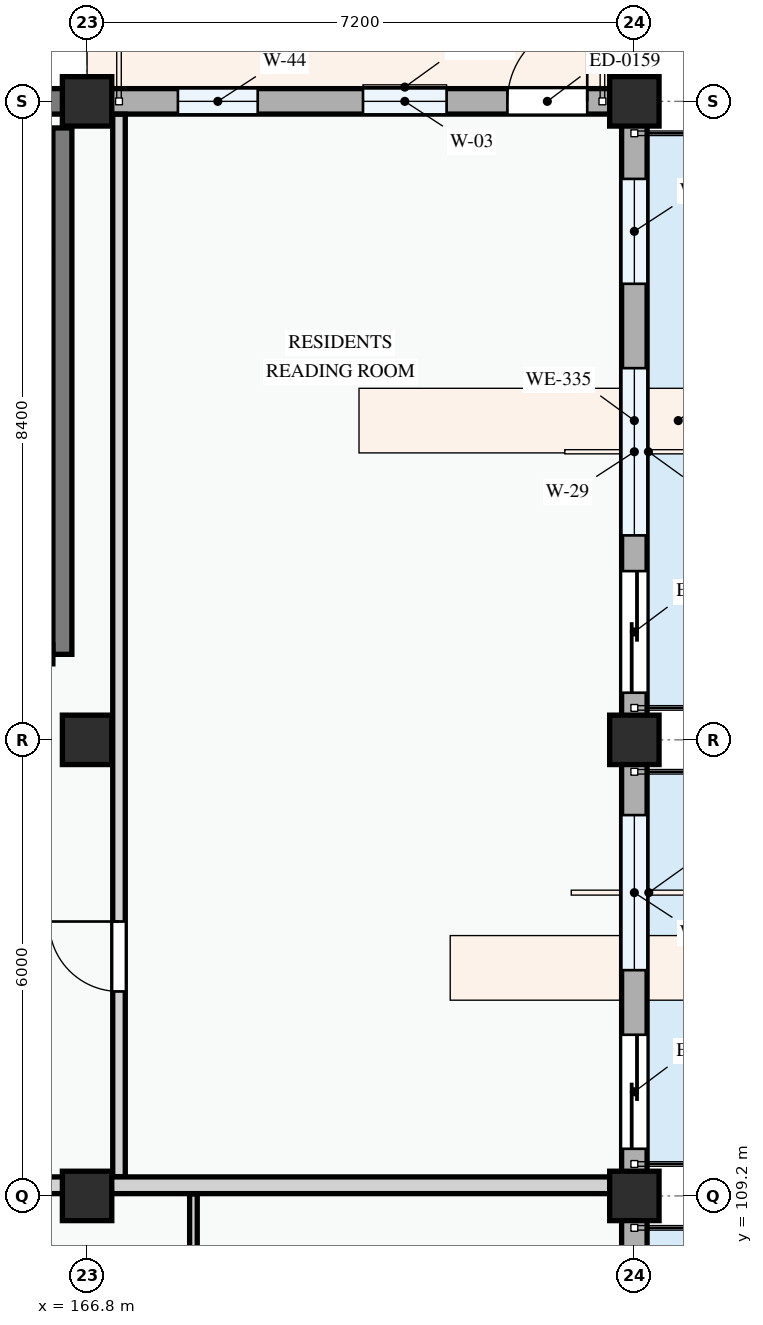
"""IFC4 building model, lengths in metres.
Left out: names, types, materials, properties, quantities, classifications, styles, units other than length and angle.
Written with IfcOpenShell. Run it as: python <this file> out.ifc"""

import sys

from ifc_helpers import new_model, si_unit, direction, frame, frame_2d, origin, origin_2d, place, context, subcontext, project, spatial, rectangle, extrude, element, fill, save


model = new_model("IFC4")
c1 = context("Model", 3, precision=1e-05, world=origin(), true_north=direction((0.0, 1.0)))
c2 = subcontext(c1, "Body", "Model", "MODEL_VIEW")
j1 = project(units=[si_unit("LENGTHUNIT", "METRE"), si_unit("PLANEANGLEUNIT", "RADIAN")], contexts=[c1])
p1 = place(None, origin())
s1 = spatial("IfcSite", under=j1, at=p1, CompositionType="ELEMENT")
p2 = place(p1, origin())
s2 = spatial("IfcBuilding", under=s1, at=p2, CompositionType="ELEMENT")
p3 = place(p2, frame((0.0, 0.0, 14.7)))
s3 = spatial("IfcBuildingStorey", under=s2, at=p3, CompositionType="ELEMENT", Elevation=14.7)
for number, where, z_axis, x_axis in (
    (1, (166.8, 109.2, 0.0), (0.0, 0.0, 1.0), (1.0, 0.0, 0.0)),
    (2, (166.8, 115.2, 0.0), (0.0, 0.0, 1.0), (1.0, 0.0, 0.0)),
    (3, (166.8, 123.6, 0.0), (0.0, 0.0, 1.0), (1.0, 0.0, 0.0)),
    (4, (174.0, 109.2, 0.0), (0.0, 0.0, 1.0), (1.0, 0.0, 0.0)),
    (5, (174.0, 115.2, 0.0), (0.0, 0.0, 1.0), (1.0, 0.0, 0.0)),
    (6, (174.0, 123.6, 0.0), (0.0, 0.0, 1.0), (1.0, 0.0, 0.0)),
):
    element("IfcColumn", number, at=place(p3, frame(where, z_axis=z_axis, x_axis=x_axis)), inside=s3, PredefinedType="COLUMN", context=c2, shape_type="SweptSolid", body=[
        extrude(rectangle(XDim=0.65, YDim=0.65, at=origin_2d()), origin(), (0.0, 0.0, 1.0), 3.3),
    ])
p4 = place(p3, frame((174.0, 109.2, 0.0), z_axis=(0.0, 0.0, 1.0), x_axis=(0.0, 1.0, 0.0)))
e7 = element("IfcWall", 7, at=p4, inside=s3, PredefinedType="STANDARD", context=c2, shape_type="SweptSolid", body=[
    extrude(rectangle(XDim=6.0, YDim=0.335, at=frame_2d((3.0, 0.0))), origin(), (0.0, 0.0, 1.0), 2.575),
])
p5 = place(p4, frame((0.62, 0.0, 0.0)))
e8 = element("IfcOpeningElement", 8, at=p5, cuts=e7, PredefinedType="OPENING", context=c2, shape_type="SweptSolid", body=[
    extrude(rectangle(XDim=1.5, YDim=2.2, at=frame_2d((0.75, 1.1))), frame((0.0, 0.177, 0.0), z_axis=(0.0, -1.0, 0.0), x_axis=(1.0, 0.0, 0.0)), (0.0, 0.0, 1.0), 0.355),
])
p6 = place(p4, frame((2.97, 0.0, 0.78)))
e9 = element("IfcOpeningElement", 9, at=p6, cuts=e7, PredefinedType="OPENING", context=c2, shape_type="SweptSolid", body=[
    extrude(rectangle(XDim=2.04, YDim=1.46, at=frame_2d((1.02, 0.73))), frame((0.0, 0.177, 0.0), z_axis=(0.0, -1.0, 0.0), x_axis=(1.0, 0.0, 0.0)), (0.0, 0.0, 1.0), 0.355),
])
p7 = place(p3, frame((174.0, 115.2, 0.0), z_axis=(0.0, 0.0, 1.0), x_axis=(0.0, 1.0, 0.0)))
e10 = element("IfcWall", 10, at=p7, inside=s3, PredefinedType="STANDARD", context=c2, shape_type="SweptSolid", body=[
    extrude(rectangle(XDim=8.4, YDim=0.335, at=frame_2d((4.2, 0.0))), origin(), (0.0, 0.0, 1.0), 2.425),
])
p8 = place(p7, frame((0.62, 0.0, 0.0)))
e11 = element("IfcOpeningElement", 11, at=p8, cuts=e10, PredefinedType="OPENING", context=c2, shape_type="SweptSolid", body=[
    extrude(rectangle(XDim=1.6, YDim=2.2, at=frame_2d((0.8, 1.1))), frame((0.0, 0.177, 0.0), z_axis=(0.0, -1.0, 0.0), x_axis=(1.0, 0.0, 0.0)), (0.0, 0.0, 1.0), 0.355),
])
p9 = place(p7, frame((2.69, 0.0, 0.78)))
e12 = element("IfcOpeningElement", 12, at=p9, cuts=e10, PredefinedType="OPENING", context=c2, shape_type="SweptSolid", body=[
    extrude(rectangle(XDim=2.2, YDim=1.5, at=frame_2d((1.1, 0.75))), frame((0.0, 0.177, 0.0), z_axis=(0.0, -1.0, 0.0), x_axis=(1.0, 0.0, 0.0)), (0.0, 0.0, 1.0), 0.355),
])
p10 = place(p7, frame((6.0, 0.0, 0.78)))
e13 = element("IfcOpeningElement", 13, at=p10, cuts=e10, PredefinedType="OPENING", context=c2, shape_type="SweptSolid", body=[
    extrude(rectangle(XDim=1.38, YDim=1.48, at=frame_2d((0.69, 0.74))), frame((0.0, 0.177, 0.0), z_axis=(0.0, -1.0, 0.0), x_axis=(1.0, 0.0, 0.0)), (0.0, 0.0, 1.0), 0.355),
])
p11 = place(p3, frame((174.0, 123.6, 0.0), z_axis=(0.0, 0.0, 1.0), x_axis=(-1.0, 0.0, 0.0)))
e14 = element("IfcWall", 14, at=p11, inside=s3, PredefinedType="STANDARD", context=c2, shape_type="SweptSolid", body=[
    extrude(rectangle(XDim=7.2, YDim=0.335, at=frame_2d((3.6, 0.0))), origin(), (0.0, 0.0, 1.0), 2.345),
])
p12 = place(p11, frame((0.62, 0.0, 0.0)))
e15 = element("IfcOpeningElement", 15, at=p12, cuts=e14, PredefinedType="OPENING", context=c2, shape_type="SweptSolid", body=[
    extrude(rectangle(XDim=1.05, YDim=2.15, at=frame_2d((0.525, 1.075))), frame((0.0, 0.177, 0.0), z_axis=(0.0, -1.0, 0.0), x_axis=(1.0, 0.0, 0.0)), (0.0, 0.0, 1.0), 0.355),
])
p13 = place(p11, frame((2.47, 0.0, 0.78)))
e16 = element("IfcOpeningElement", 16, at=p13, cuts=e14, PredefinedType="OPENING", context=c2, shape_type="SweptSolid", body=[
    extrude(rectangle(XDim=1.1, YDim=1.3, at=frame_2d((0.55, 0.65))), frame((0.0, 0.177, 0.0), z_axis=(0.0, -1.0, 0.0), x_axis=(1.0, 0.0, 0.0)), (0.0, 0.0, 1.0), 0.355),
])
p14 = place(p11, frame((4.955, 0.0, 0.78)))
e17 = element("IfcOpeningElement", 17, at=p14, cuts=e14, PredefinedType="OPENING", context=c2, shape_type="SweptSolid", body=[
    extrude(rectangle(XDim=1.05, YDim=1.2, at=frame_2d((0.525, 0.6))), frame((0.0, 0.177, 0.0), z_axis=(0.0, -1.0, 0.0), x_axis=(1.0, 0.0, 0.0)), (0.0, 0.0, 1.0), 0.355),
])
p15 = place(p3, frame((166.8, 123.6, 0.0), z_axis=(0.0, 0.0, 1.0), x_axis=(-1.0, 0.0, 0.0)))
e18 = element("IfcWall", 18, at=p15, inside=s3, PredefinedType="STANDARD", context=c2, shape_type="SweptSolid", body=[
    extrude(rectangle(XDim=0.65, YDim=0.335, at=frame_2d((0.325, 0.0))), origin(), (0.0, 0.0, 1.0), 3.04),
])
p16 = place(p3, frame((174.0, 100.8, 0.0), z_axis=(0.0, 0.0, 1.0), x_axis=(0.0, 1.0, 0.0)))
e19 = element("IfcWall", 19, at=p16, inside=s3, PredefinedType="STANDARD", context=c2, shape_type="SweptSolid", body=[
    extrude(rectangle(XDim=8.4, YDim=0.335, at=frame_2d((4.2, 0.0))), origin(), (0.0, 0.0, 1.0), 2.425),
])
p17 = place(p16, frame((3.462, 0.0, 0.0)))
e20 = element("IfcOpeningElement", 20, at=p17, cuts=e19, PredefinedType="OPENING", context=c2, shape_type="SweptSolid", body=[
    extrude(rectangle(XDim=1.25, YDim=2.2, at=frame_2d((0.625, 1.1))), frame((0.0, 0.177, 0.0), z_axis=(0.0, -1.0, 0.0), x_axis=(1.0, 0.0, 0.0)), (0.0, 0.0, 1.0), 0.355),
])
p18 = place(p16, frame((0.571, 0.0, 0.78)))
e21 = element("IfcOpeningElement", 21, at=p18, cuts=e19, PredefinedType="OPENING", context=c2, shape_type="SweptSolid", body=[
    extrude(rectangle(XDim=2.18, YDim=1.48, at=frame_2d((1.09, 0.74))), frame((0.0, 0.177, 0.0), z_axis=(0.0, -1.0, 0.0), x_axis=(1.0, 0.0, 0.0)), (0.0, 0.0, 1.0), 0.355),
])
p19 = place(p16, frame((5.676, 0.0, 0.78)))
e22 = element("IfcOpeningElement", 22, at=p19, cuts=e19, PredefinedType="OPENING", context=c2, shape_type="SweptSolid", body=[
    extrude(rectangle(XDim=1.62, YDim=1.38, at=frame_2d((0.81, 0.69))), frame((0.0, 0.177, 0.0), z_axis=(0.0, -1.0, 0.0), x_axis=(1.0, 0.0, 0.0)), (0.0, 0.0, 1.0), 0.355),
])
p20 = place(p3, frame((166.475, 123.25, 0.0), z_axis=(0.0, 0.0, 1.0), x_axis=(0.0, -1.0, 0.0)))
e23 = element("IfcWall", 23, at=p20, inside=s3, PredefinedType="SHEAR", context=c2, shape_type="SweptSolid", body=[
    extrude(rectangle(XDim=6.925, YDim=0.25, at=frame_2d((3.462, 0.0))), origin(), (0.0, 0.0, 1.0), 3.0),
])
p21 = place(p3, frame((167.22, 109.452, 0.0), z_axis=(0.0, 0.0, 1.0), x_axis=(0.0, 1.0, 0.0)))
e24 = element("IfcWall", 24, at=p21, inside=s3, PredefinedType="PARTITIONING", context=c2, shape_type="SweptSolid", body=[
    extrude(rectangle(XDim=13.979, YDim=0.165, at=frame_2d((6.989, 0.0))), origin(), (0.0, 0.0, 1.0), 2.425),
])
p22 = place(p21, frame((2.438, 0.0, 0.0)))
e25 = element("IfcOpeningElement", 25, at=p22, cuts=e24, PredefinedType="OPENING", context=c2, shape_type="SweptSolid", body=[
    extrude(rectangle(XDim=0.92, YDim=2.1, at=frame_2d((0.46, 1.05))), frame((0.0, 0.093, 0.0), z_axis=(0.0, -1.0, 0.0), x_axis=(1.0, 0.0, 0.0)), (0.0, 0.0, 1.0), 0.185),
])
p23 = place(p3, frame((168.199, 103.991, 0.0), z_axis=(0.0, 0.0, 1.0), x_axis=(0.0, 1.0, 0.0)))
e26 = element("IfcWall", 26, at=p23, inside=s3, PredefinedType="PARTITIONING", context=c2, shape_type="SweptSolid", body=[
    extrude(rectangle(XDim=5.237, YDim=0.1, at=frame_2d((2.618, 0.0))), origin(), (0.0, 0.0, 1.0), 3.0),
])
p24 = place(p3, frame((162.064, 109.34, 0.0), z_axis=(0.0, 0.0, 1.0), x_axis=(1.0, 0.0, 0.0)))
e27 = element("IfcWall", 27, at=p24, inside=s3, PredefinedType="PARTITIONING", context=c2, shape_type="SweptSolid", body=[
    extrude(rectangle(XDim=11.766, YDim=0.22, at=frame_2d((5.883, 0.0))), origin(), (0.0, 0.0, 1.0), 2.375),
])
p25 = place(p5, frame((1.5, 0.0, 0.0), z_axis=(0.0, 0.0, 1.0), x_axis=(-1.0, 0.0, 0.0)))
e28 = element("IfcDoor", 28, at=p25, inside=s3, OperationType="SLIDING_TO_RIGHT", PredefinedType="DOOR", context=c2, shape_type="SweptSolid", body=[
    extrude(rectangle(XDim=1.5, YDim=2.2, at=frame_2d((0.75, 1.1))), frame((0.0, 0.025, 0.0), z_axis=(0.0, -1.0, 0.0), x_axis=(1.0, 0.0, 0.0)), (0.0, 0.0, 1.0), 0.05),
])
fill(e8, e28)
p26 = place(p6, origin())
e29 = element("IfcWindow", 29, at=p26, inside=s3, PartitioningType="DOUBLE_PANEL_VERTICAL", PredefinedType="WINDOW", context=c2, shape_type="SweptSolid", body=[
    extrude(rectangle(XDim=2.04, YDim=1.46, at=frame_2d((1.02, 0.73))), frame((0.0, 0.03, 0.0), z_axis=(0.0, -1.0, 0.0), x_axis=(1.0, 0.0, 0.0)), (0.0, 0.0, 1.0), 0.06),
])
fill(e9, e29)
p27 = place(p8, frame((1.6, 0.0, 0.0), z_axis=(0.0, 0.0, 1.0), x_axis=(-1.0, 0.0, 0.0)))
e30 = element("IfcDoor", 30, at=p27, inside=s3, OperationType="SLIDING_TO_LEFT", PredefinedType="DOOR", context=c2, shape_type="SweptSolid", body=[
    extrude(rectangle(XDim=1.6, YDim=2.2, at=frame_2d((0.8, 1.1))), frame((0.0, 0.025, 0.0), z_axis=(0.0, -1.0, 0.0), x_axis=(1.0, 0.0, 0.0)), (0.0, 0.0, 1.0), 0.05),
])
fill(e11, e30)
p28 = place(p9, origin())
e31 = element("IfcWindow", 31, at=p28, inside=s3, PartitioningType="DOUBLE_PANEL_VERTICAL", PredefinedType="WINDOW", context=c2, shape_type="SweptSolid", body=[
    extrude(rectangle(XDim=2.2, YDim=1.5, at=frame_2d((1.1, 0.75))), frame((0.0, 0.03, 0.0), z_axis=(0.0, -1.0, 0.0), x_axis=(1.0, 0.0, 0.0)), (0.0, 0.0, 1.0), 0.06),
])
fill(e12, e31)
p29 = place(p10, origin())
e32 = element("IfcWindow", 32, at=p29, inside=s3, PartitioningType="SINGLE_PANEL", PredefinedType="WINDOW", context=c2, shape_type="SweptSolid", body=[
    extrude(rectangle(XDim=1.38, YDim=1.48, at=frame_2d((0.69, 0.74))), frame((0.0, 0.03, 0.0), z_axis=(0.0, -1.0, 0.0), x_axis=(1.0, 0.0, 0.0)), (0.0, 0.0, 1.0), 0.06),
])
fill(e13, e32)
p30 = place(p12, frame((1.05, 0.0, 0.0), z_axis=(0.0, 0.0, 1.0), x_axis=(-1.0, 0.0, 0.0)))
e33 = element("IfcDoor", 33, at=p30, inside=s3, OperationType="SINGLE_SWING_RIGHT", PredefinedType="DOOR", context=c2, shape_type="SweptSolid", body=[
    extrude(rectangle(XDim=1.05, YDim=2.15, at=frame_2d((0.525, 1.075))), frame((0.0, 0.025, 0.0), z_axis=(0.0, -1.0, 0.0), x_axis=(1.0, 0.0, 0.0)), (0.0, 0.0, 1.0), 0.05),
])
fill(e15, e33)
p31 = place(p13, origin())
e34 = element("IfcWindow", 34, at=p31, inside=s3, PartitioningType="SINGLE_PANEL", PredefinedType="WINDOW", context=c2, shape_type="SweptSolid", body=[
    extrude(rectangle(XDim=1.1, YDim=1.3, at=frame_2d((0.55, 0.65))), frame((0.0, 0.03, 0.0), z_axis=(0.0, -1.0, 0.0), x_axis=(1.0, 0.0, 0.0)), (0.0, 0.0, 1.0), 0.06),
])
fill(e16, e34)
p32 = place(p14, origin())
e35 = element("IfcWindow", 35, at=p32, inside=s3, PartitioningType="SINGLE_PANEL", PredefinedType="WINDOW", context=c2, shape_type="SweptSolid", body=[
    extrude(rectangle(XDim=1.05, YDim=1.2, at=frame_2d((0.525, 0.6))), frame((0.0, 0.03, 0.0), z_axis=(0.0, -1.0, 0.0), x_axis=(1.0, 0.0, 0.0)), (0.0, 0.0, 1.0), 0.06),
])
fill(e17, e35)
p33 = place(p22, origin())
e36 = element("IfcDoor", 36, at=p33, inside=s3, OperationType="SINGLE_SWING_RIGHT", PredefinedType="DOOR", context=c2, shape_type="SweptSolid", body=[
    extrude(rectangle(XDim=0.92, YDim=2.1, at=frame_2d((0.46, 1.05))), frame((0.0, 0.025, 0.0), z_axis=(0.0, -1.0, 0.0), x_axis=(1.0, 0.0, 0.0)), (0.0, 0.0, 1.0), 0.05),
])
fill(e25, e36)
save(model, sys.argv[1])
